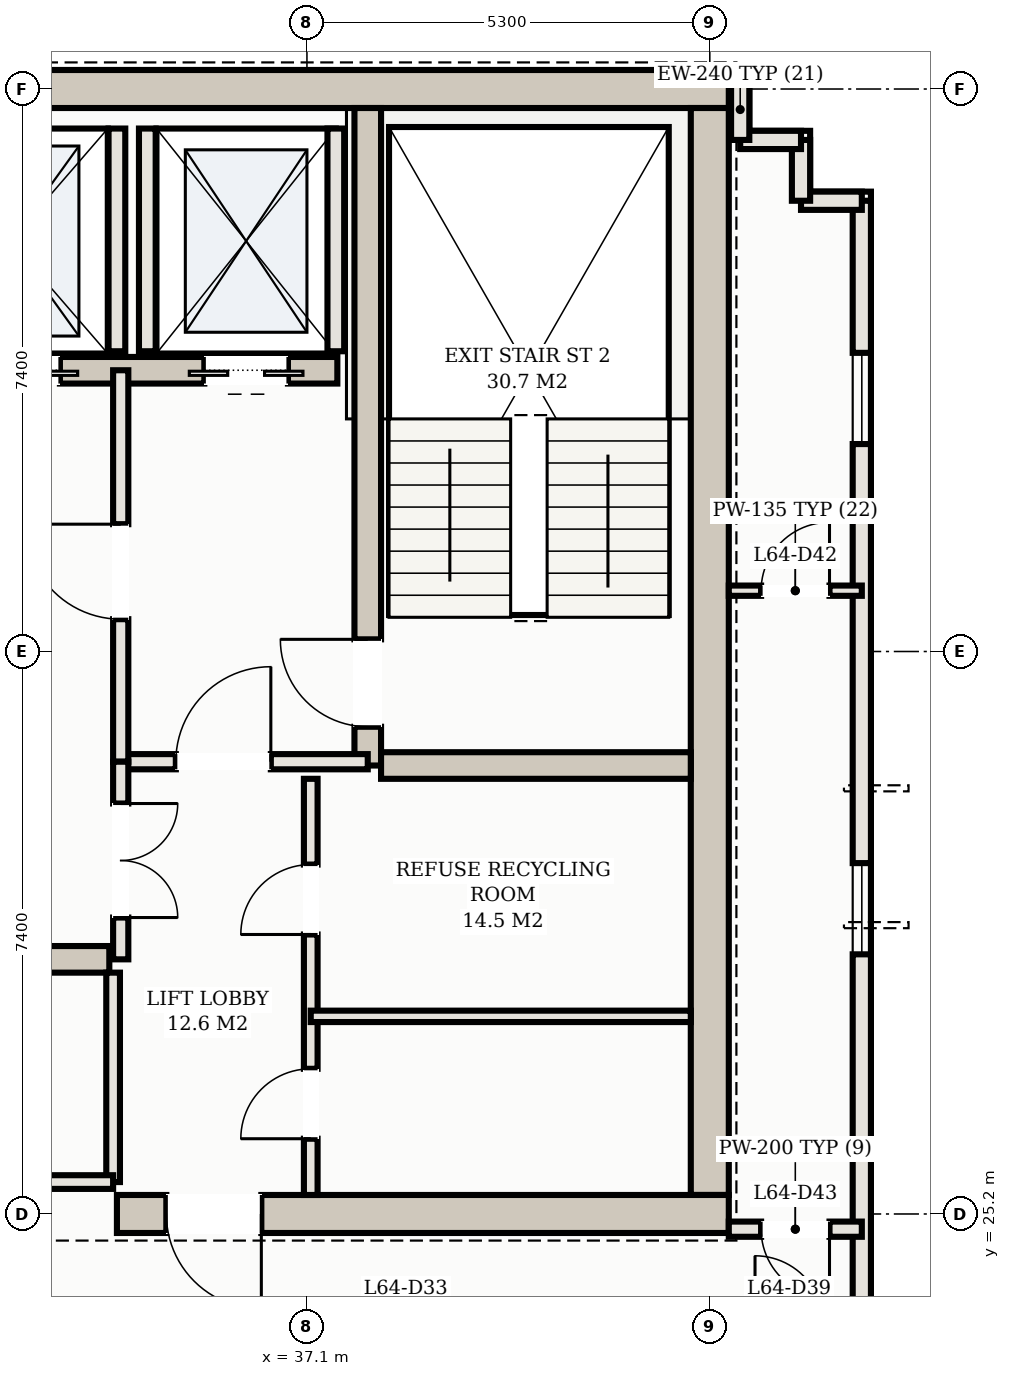
"""IFC4 building model, lengths in metres.
Left out: names, types, materials, properties, quantities, classifications, styles, units other than length and angle.
Written with IfcOpenShell. Run it as: python <this file> out.ifc"""

import sys

from ifc_helpers import new_model, si_unit, direction, frame, frame_2d, origin, place, context, subcontext, project, spatial, rectangle, extrude, element, fill, save


model = new_model("IFC4")
c1 = context("Model", 3, precision=1e-05, world=origin(), true_north=direction((0.0, 1.0)))
c2 = subcontext(c1, "Body", "Model", "MODEL_VIEW")
j1 = project(units=[si_unit("LENGTHUNIT", "METRE"), si_unit("PLANEANGLEUNIT", "RADIAN")], contexts=[c1])
p1 = place(None, origin())
s1 = spatial("IfcSite", under=j1, at=p1, CompositionType="ELEMENT")
p2 = place(p1, origin())
s2 = spatial("IfcBuilding", under=s1, at=p2, CompositionType="ELEMENT")
p3 = place(p2, frame((0.0, 0.0, 233.0)))
s3 = spatial("IfcBuildingStorey", under=s2, at=p3, CompositionType="ELEMENT", Elevation=233.0)
p4 = place(p3, frame((10.35, 40.0, 0.0), z_axis=(0.0, 0.0, 1.0), x_axis=(1.0, 0.0, 0.0)))
e1 = element("IfcWall", 1, at=p4, inside=s3, PredefinedType="SHEAR", context=c2, shape_type="SweptSolid", body=[
    extrude(rectangle(XDim=32.3, YDim=0.5, at=frame_2d((16.15, 0.0))), origin(), (0.0, 0.0, 1.0), 3.11),
])
p5 = place(p3, frame((42.4, 25.45, 0.0), z_axis=(0.0, 0.0, 1.0), x_axis=(0.0, 1.0, 0.0)))
e2 = element("IfcWall", 2, at=p5, inside=s3, PredefinedType="SHEAR", context=c2, shape_type="SweptSolid", body=[
    extrude(rectangle(XDim=14.3, YDim=0.5, at=frame_2d((7.15, 0.0))), origin(), (0.0, 0.0, 1.0), 3.11),
])
p6 = place(p3, frame((34.6, 25.2, 0.0), z_axis=(0.0, 0.0, 1.0), x_axis=(1.0, 0.0, 0.0)))
e3 = element("IfcWall", 3, at=p6, inside=s3, PredefinedType="SHEAR", context=c2, shape_type="SweptSolid", body=[
    extrude(rectangle(XDim=8.05, YDim=0.5, at=frame_2d((4.025, 0.0))), origin(), (0.0, 0.0, 1.0), 3.11),
])
p7 = place(p6, frame((0.65, 0.0, 0.0)))
e4 = element("IfcOpeningElement", 4, at=p7, cuts=e3, PredefinedType="OPENING", context=c2, shape_type="SweptSolid", body=[
    extrude(rectangle(XDim=1.25, YDim=2.2, at=frame_2d((0.625, 1.1))), frame((0.0, 0.26, 0.0), z_axis=(0.0, -1.0, 0.0), x_axis=(1.0, 0.0, 0.0)), (0.0, 0.0, 1.0), 0.52),
])
p8 = place(p3, frame((37.9, 31.1, 0.0), z_axis=(0.0, 0.0, 1.0), x_axis=(0.0, 1.0, 0.0)))
e5 = element("IfcWall", 5, at=p8, inside=s3, PredefinedType="SHEAR", context=c2, shape_type="SweptSolid", body=[
    extrude(rectangle(XDim=8.65, YDim=0.35, at=frame_2d((4.325, 0.0))), origin(), (0.0, 0.0, 1.0), 3.11),
])
p9 = place(p8, frame((0.51, 0.0, 0.0)))
e6 = element("IfcOpeningElement", 6, at=p9, cuts=e5, PredefinedType="OPENING", context=c2, shape_type="SweptSolid", body=[
    extrude(rectangle(XDim=1.15, YDim=2.2, at=frame_2d((0.575, 1.1))), frame((0.0, 0.185, 0.0), z_axis=(0.0, -1.0, 0.0), x_axis=(1.0, 0.0, 0.0)), (0.0, 0.0, 1.0), 0.37),
])
p10 = place(p3, frame((38.075, 31.1, 0.0), z_axis=(0.0, 0.0, 1.0), x_axis=(1.0, 0.0, 0.0)))
e7 = element("IfcWall", 7, at=p10, inside=s3, PredefinedType="SHEAR", context=c2, shape_type="SweptSolid", body=[
    extrude(rectangle(XDim=4.075, YDim=0.35, at=frame_2d((2.038, 0.0))), origin(), (0.0, 0.0, 1.0), 3.11),
])
p11 = place(p3, frame((15.5, 36.3, 0.0), z_axis=(0.0, 0.0, 1.0), x_axis=(1.0, 0.0, 0.0)))
e8 = element("IfcWall", 8, at=p11, inside=s3, PredefinedType="SHEAR", context=c2, shape_type="SweptSolid", body=[
    extrude(rectangle(XDim=22.0, YDim=0.35, at=frame_2d((11.0, 0.0))), origin(), (0.0, 0.0, 1.0), 3.11),
])
p12 = place(p11, frame((0.65, 0.0, 0.0)))
e9 = element("IfcOpeningElement", 9, at=p12, cuts=e8, PredefinedType="OPENING", context=c2, shape_type="SweptSolid", body=[
    extrude(rectangle(XDim=1.1, YDim=2.15, at=frame_2d((0.55, 1.075))), frame((0.0, 0.185, 0.0), z_axis=(0.0, -1.0, 0.0), x_axis=(1.0, 0.0, 0.0)), (0.0, 0.0, 1.0), 0.37),
])
p13 = place(p11, frame((20.25, 0.0, 0.0)))
e10 = element("IfcOpeningElement", 10, at=p13, cuts=e8, PredefinedType="OPENING", context=c2, shape_type="SweptSolid", body=[
    extrude(rectangle(XDim=1.1, YDim=2.15, at=frame_2d((0.55, 1.075))), frame((0.0, 0.185, 0.0), z_axis=(0.0, -1.0, 0.0), x_axis=(1.0, 0.0, 0.0)), (0.0, 0.0, 1.0), 0.37),
])
p14 = place(p11, frame((17.05, 0.0, 0.0)))
e11 = element("IfcOpeningElement", 11, at=p14, cuts=e8, PredefinedType="OPENING", context=c2, shape_type="SweptSolid", body=[
    extrude(rectangle(XDim=1.3, YDim=2.2, at=frame_2d((0.65, 1.1))), frame((0.0, 0.185, 0.0), z_axis=(0.0, -1.0, 0.0), x_axis=(1.0, 0.0, 0.0)), (0.0, 0.0, 1.0), 0.37),
])
p15 = place(p11, frame((3.95, 0.0, 0.0)))
e12 = element("IfcOpeningElement", 12, at=p15, cuts=e8, PredefinedType="OPENING", context=c2, shape_type="SweptSolid", body=[
    extrude(rectangle(XDim=1.1, YDim=2.15, at=frame_2d((0.55, 1.075))), frame((0.0, 0.185, 0.0), z_axis=(0.0, -1.0, 0.0), x_axis=(1.0, 0.0, 0.0)), (0.0, 0.0, 1.0), 0.37),
])
p16 = place(p11, frame((6.55, 0.0, 0.0)))
e13 = element("IfcOpeningElement", 13, at=p16, cuts=e8, PredefinedType="OPENING", context=c2, shape_type="SweptSolid", body=[
    extrude(rectangle(XDim=1.1, YDim=2.15, at=frame_2d((0.55, 1.075))), frame((0.0, 0.185, 0.0), z_axis=(0.0, -1.0, 0.0), x_axis=(1.0, 0.0, 0.0)), (0.0, 0.0, 1.0), 0.37),
])
p17 = place(p11, frame((9.15, 0.0, 0.0)))
e14 = element("IfcOpeningElement", 14, at=p17, cuts=e8, PredefinedType="OPENING", context=c2, shape_type="SweptSolid", body=[
    extrude(rectangle(XDim=1.1, YDim=2.15, at=frame_2d((0.55, 1.075))), frame((0.0, 0.185, 0.0), z_axis=(0.0, -1.0, 0.0), x_axis=(1.0, 0.0, 0.0)), (0.0, 0.0, 1.0), 0.37),
])
p18 = place(p3, frame((18.5, 28.55, 0.0), z_axis=(0.0, 0.0, 1.0), x_axis=(1.0, 0.0, 0.0)))
e15 = element("IfcWall", 15, at=p18, inside=s3, PredefinedType="SHEAR", context=c2, shape_type="SweptSolid", body=[
    extrude(rectangle(XDim=16.0, YDim=0.35, at=frame_2d((8.0, 0.0))), origin(), (0.0, 0.0, 1.0), 3.11),
])
for number, where, z_axis, x_axis in (
    (16, (35.0, 36.55, 0.0), (0.0, 0.0, 1.0), (0.0, 1.0, 0.0)),
    (17, (37.48, 36.55, 0.0), (0.0, 0.0, 1.0), (0.0, 1.0, 0.0)),
    (18, (34.6, 36.55, 0.0), (0.0, 0.0, 1.0), (0.0, 1.0, 0.0)),
):
    element("IfcWall", number, at=place(p3, frame(where, z_axis=z_axis, x_axis=x_axis)), inside=s3, PredefinedType="SOLIDWALL", context=c2, shape_type="SweptSolid", body=[
        extrude(rectangle(XDim=2.93, YDim=0.22, at=frame_2d((1.465, 0.0))), origin(), (0.0, 0.0, 1.0), 3.11),
    ])
p19 = place(p3, frame((44.4, 12.52, 0.0), z_axis=(0.0, 0.0, 1.0), x_axis=(0.0, 1.0, 0.0)))
e19 = element("IfcWall", 19, at=p19, inside=s3, PredefinedType="SOLIDWALL", context=c2, shape_type="SweptSolid", body=[
    extrude(rectangle(XDim=26.01, YDim=0.24, at=frame_2d((13.005, 0.0))), origin(), (0.0, 0.0, 1.0), 3.11),
])
p20 = place(p19, frame((4.48, 0.0, 0.0)))
e20 = element("IfcOpeningElement", 20, at=p20, cuts=e19, PredefinedType="OPENING", context=c2, shape_type="SweptSolid", body=[
    extrude(rectangle(XDim=1.8, YDim=2.2, at=frame_2d((0.9, 1.1))), frame((0.0, 0.13, 0.0), z_axis=(0.0, -1.0, 0.0), x_axis=(1.0, 0.0, 0.0)), (0.0, 0.0, 1.0), 0.26),
])
p21 = place(p19, frame((0.426, 0.0, 0.75)))
e21 = element("IfcOpeningElement", 21, at=p21, cuts=e19, PredefinedType="OPENING", context=c2, shape_type="SweptSolid", body=[
    extrude(rectangle(XDim=1.5, YDim=1.6, at=frame_2d((0.75, 0.8))), frame((0.0, 0.13, 0.0), z_axis=(0.0, -1.0, 0.0), x_axis=(1.0, 0.0, 0.0)), (0.0, 0.0, 1.0), 0.26),
])
p22 = place(p19, frame((2.784, 0.0, 0.75)))
e22 = element("IfcOpeningElement", 22, at=p22, cuts=e19, PredefinedType="OPENING", context=c2, shape_type="SweptSolid", body=[
    extrude(rectangle(XDim=1.2, YDim=1.5, at=frame_2d((0.6, 0.75))), frame((0.0, 0.13, 0.0), z_axis=(0.0, -1.0, 0.0), x_axis=(1.0, 0.0, 0.0)), (0.0, 0.0, 1.0), 0.26),
])
p23 = place(p19, frame((8.135, 0.0, 0.75)))
e23 = element("IfcOpeningElement", 23, at=p23, cuts=e19, PredefinedType="OPENING", context=c2, shape_type="SweptSolid", body=[
    extrude(rectangle(XDim=1.2, YDim=1.5, at=frame_2d((0.6, 0.75))), frame((0.0, 0.13, 0.0), z_axis=(0.0, -1.0, 0.0), x_axis=(1.0, 0.0, 0.0)), (0.0, 0.0, 1.0), 0.26),
])
p24 = place(p19, frame((16.096, 0.0, 0.75)))
e24 = element("IfcOpeningElement", 24, at=p24, cuts=e19, PredefinedType="OPENING", context=c2, shape_type="SweptSolid", body=[
    extrude(rectangle(XDim=1.2, YDim=1.5, at=frame_2d((0.6, 0.75))), frame((0.0, 0.13, 0.0), z_axis=(0.0, -1.0, 0.0), x_axis=(1.0, 0.0, 0.0)), (0.0, 0.0, 1.0), 0.26),
])
p25 = place(p19, frame((22.809, 0.0, 0.75)))
e25 = element("IfcOpeningElement", 25, at=p25, cuts=e19, PredefinedType="OPENING", context=c2, shape_type="SweptSolid", body=[
    extrude(rectangle(XDim=1.2, YDim=1.5, at=frame_2d((0.6, 0.75))), frame((0.0, 0.13, 0.0), z_axis=(0.0, -1.0, 0.0), x_axis=(1.0, 0.0, 0.0)), (0.0, 0.0, 1.0), 0.26),
])
p26 = place(p3, frame((44.4, 38.53, 0.0), z_axis=(0.0, 0.0, 1.0), x_axis=(-1.0, 0.0, 0.0)))
e26 = element("IfcWall", 26, at=p26, inside=s3, PredefinedType="SOLIDWALL", context=c2, shape_type="SweptSolid", body=[
    extrude(rectangle(XDim=0.8, YDim=0.24, at=frame_2d((0.4, 0.0))), origin(), (0.0, 0.0, 1.0), 3.11),
])
for number, where, z_axis, x_axis in (
    (27, (43.6, 38.53, 0.0), (0.0, 0.0, 1.0), (0.0, 1.0, 0.0)),
    (28, (43.6, 39.33, 0.0), (0.0, 0.0, 1.0), (-1.0, 0.0, 0.0)),
):
    element("IfcWall", number, at=place(p3, frame(where, z_axis=z_axis, x_axis=x_axis)), inside=s3, PredefinedType="SOLIDWALL", context=c2, shape_type="SweptSolid", body=[
        extrude(rectangle(XDim=0.8, YDim=0.24, at=frame_2d((0.4, 0.0))), origin(), (0.0, 0.0, 1.0), 3.11),
    ])
p27 = place(p3, frame((42.8, 39.33, 0.0), z_axis=(0.0, 0.0, 1.0), x_axis=(0.0, 1.0, 0.0)))
e29 = element("IfcWall", 29, at=p27, inside=s3, PredefinedType="SOLIDWALL", context=c2, shape_type="SweptSolid", body=[
    extrude(rectangle(XDim=0.8, YDim=0.24, at=frame_2d((0.4, 0.0))), origin(), (0.0, 0.0, 1.0), 3.11),
])
p28 = place(p3, frame((34.65, 31.15, 0.0), z_axis=(0.0, 0.0, 1.0), x_axis=(1.0, 0.0, 0.0)))
e30 = element("IfcWall", 30, at=p28, inside=s3, PredefinedType="PARTITIONING", context=c2, shape_type="SweptSolid", body=[
    extrude(rectangle(XDim=3.25, YDim=0.2, at=frame_2d((1.625, 0.0))), origin(), (0.0, 0.0, 1.0), 2.45),
])
p29 = place(p28, frame((0.725, 0.0, 0.0)))
e31 = element("IfcOpeningElement", 31, at=p29, cuts=e30, PredefinedType="OPENING", context=c2, shape_type="SweptSolid", body=[
    extrude(rectangle(XDim=1.25, YDim=2.2, at=frame_2d((0.625, 1.1))), frame((0.0, 0.11, 0.0), z_axis=(0.0, -1.0, 0.0), x_axis=(1.0, 0.0, 0.0)), (0.0, 0.0, 1.0), 0.22),
])
p30 = place(p3, frame((34.65, 31.15, 0.0), z_axis=(0.0, 0.0, 1.0), x_axis=(0.0, 1.0, 0.0)))
e32 = element("IfcWall", 32, at=p30, inside=s3, PredefinedType="PARTITIONING", context=c2, shape_type="SweptSolid", body=[
    extrude(rectangle(XDim=5.15, YDim=0.2, at=frame_2d((2.575, 0.0))), origin(), (0.0, 0.0, 1.0), 2.45),
])
p31 = place(p30, frame((1.875, 0.0, 0.0)))
e33 = element("IfcOpeningElement", 33, at=p31, cuts=e32, PredefinedType="OPENING", context=c2, shape_type="SweptSolid", body=[
    extrude(rectangle(XDim=1.25, YDim=2.2, at=frame_2d((0.625, 1.1))), frame((0.0, 0.11, 0.0), z_axis=(0.0, -1.0, 0.0), x_axis=(1.0, 0.0, 0.0)), (0.0, 0.0, 1.0), 0.22),
])
p32 = place(p3, frame((37.15, 25.45, 0.0), z_axis=(0.0, 0.0, 1.0), x_axis=(0.0, 1.0, 0.0)))
e34 = element("IfcWall", 34, at=p32, inside=s3, PredefinedType="PARTITIONING", context=c2, shape_type="SweptSolid", body=[
    extrude(rectangle(XDim=5.475, YDim=0.18, at=frame_2d((2.738, 0.0))), origin(), (0.0, 0.0, 1.0), 2.45),
])
p33 = place(p32, frame((0.74, 0.0, 0.0)))
e35 = element("IfcOpeningElement", 35, at=p33, cuts=e34, PredefinedType="OPENING", context=c2, shape_type="SweptSolid", body=[
    extrude(rectangle(XDim=0.92, YDim=2.15, at=frame_2d((0.46, 1.075))), frame((0.0, 0.1, 0.0), z_axis=(0.0, -1.0, 0.0), x_axis=(1.0, 0.0, 0.0)), (0.0, 0.0, 1.0), 0.2),
])
p34 = place(p32, frame((3.427, 0.0, 0.0)))
e36 = element("IfcOpeningElement", 36, at=p34, cuts=e34, PredefinedType="OPENING", context=c2, shape_type="SweptSolid", body=[
    extrude(rectangle(XDim=0.92, YDim=2.15, at=frame_2d((0.46, 1.075))), frame((0.0, 0.1, 0.0), z_axis=(0.0, -1.0, 0.0), x_axis=(1.0, 0.0, 0.0)), (0.0, 0.0, 1.0), 0.2),
])
p35 = place(p3, frame((37.15, 27.8, 0.0), z_axis=(0.0, 0.0, 1.0), x_axis=(1.0, 0.0, 0.0)))
e37 = element("IfcWall", 37, at=p35, inside=s3, PredefinedType="PARTITIONING", context=c2, shape_type="SweptSolid", body=[
    extrude(rectangle(XDim=5.0, YDim=0.15, at=frame_2d((2.5, 0.0))), origin(), (0.0, 0.0, 1.0), 2.45),
])
p36 = place(p3, frame((34.65, 28.55, 0.0), z_axis=(0.0, 0.0, 1.0), x_axis=(0.0, 1.0, 0.0)))
e38 = element("IfcWall", 38, at=p36, inside=s3, PredefinedType="PARTITIONING", context=c2, shape_type="SweptSolid", body=[
    extrude(rectangle(XDim=2.6, YDim=0.2, at=frame_2d((1.3, 0.0))), origin(), (0.0, 0.0, 1.0), 2.45),
])
p37 = place(p36, frame((0.55, 0.0, 0.0)))
e39 = element("IfcOpeningElement", 39, at=p37, cuts=e38, PredefinedType="OPENING", context=c2, shape_type="SweptSolid", body=[
    extrude(rectangle(XDim=1.5, YDim=2.25, at=frame_2d((0.75, 1.125))), frame((0.0, 0.11, 0.0), z_axis=(0.0, -1.0, 0.0), x_axis=(1.0, 0.0, 0.0)), (0.0, 0.0, 1.0), 0.22),
])
p38 = place(p3, frame((34.55, 25.62, 0.0), z_axis=(0.0, 0.0, 1.0), x_axis=(0.0, 1.0, 0.0)))
e40 = element("IfcWall", 40, at=p38, inside=s3, PredefinedType="PARTITIONING", context=c2, shape_type="SweptSolid", body=[
    extrude(rectangle(XDim=2.755, YDim=0.18, at=frame_2d((1.377, 0.0))), origin(), (0.0, 0.0, 1.0), 2.45),
])
p39 = place(p3, frame((26.65, 25.62, 0.0), z_axis=(0.0, 0.0, 1.0), x_axis=(1.0, 0.0, 0.0)))
e41 = element("IfcWall", 41, at=p39, inside=s3, PredefinedType="PARTITIONING", context=c2, shape_type="SweptSolid", body=[
    extrude(rectangle(XDim=7.9, YDim=0.18, at=frame_2d((3.95, 0.0))), origin(), (0.0, 0.0, 1.0), 2.45),
])
p40 = place(p39, frame((3.34, 0.0, 0.0)))
e42 = element("IfcOpeningElement", 42, at=p40, cuts=e41, PredefinedType="OPENING", context=c2, shape_type="SweptSolid", body=[
    extrude(rectangle(XDim=0.92, YDim=2.15, at=frame_2d((0.46, 1.075))), frame((0.0, 0.1, 0.0), z_axis=(0.0, -1.0, 0.0), x_axis=(1.0, 0.0, 0.0)), (0.0, 0.0, 1.0), 0.2),
])
p41 = place(p3, frame((42.65, 25.0, 0.0), z_axis=(0.0, 0.0, 1.0), x_axis=(1.0, 0.0, 0.0)))
e43 = element("IfcWall", 43, at=p41, inside=s3, PredefinedType="PARTITIONING", context=c2, shape_type="SweptSolid", body=[
    extrude(rectangle(XDim=1.75, YDim=0.2, at=frame_2d((0.875, 0.0))), origin(), (0.0, 0.0, 1.0), 2.45),
])
p42 = place(p41, frame((0.425, 0.0, 0.0)))
e44 = element("IfcOpeningElement", 44, at=p42, cuts=e43, PredefinedType="OPENING", context=c2, shape_type="SweptSolid", body=[
    extrude(rectangle(XDim=0.9, YDim=2.15, at=frame_2d((0.45, 1.075))), frame((0.0, 0.11, 0.0), z_axis=(0.0, -1.0, 0.0), x_axis=(1.0, 0.0, 0.0)), (0.0, 0.0, 1.0), 0.22),
])
p43 = place(p3, frame((42.65, 33.4, 0.0), z_axis=(0.0, 0.0, 1.0), x_axis=(1.0, 0.0, 0.0)))
e45 = element("IfcWall", 45, at=p43, inside=s3, PredefinedType="PARTITIONING", context=c2, shape_type="SweptSolid", body=[
    extrude(rectangle(XDim=1.75, YDim=0.135, at=frame_2d((0.875, 0.0))), origin(), (0.0, 0.0, 1.0), 2.45),
])
p44 = place(p43, frame((0.425, 0.0, 0.0)))
e46 = element("IfcOpeningElement", 46, at=p44, cuts=e45, PredefinedType="OPENING", context=c2, shape_type="SweptSolid", body=[
    extrude(rectangle(XDim=0.9, YDim=2.15, at=frame_2d((0.45, 1.075))), frame((0.0, 0.078, 0.0), z_axis=(0.0, -1.0, 0.0), x_axis=(1.0, 0.0, 0.0)), (0.0, 0.0, 1.0), 0.155),
])
p45 = place(p13, frame((1.1, 0.0, 0.0), z_axis=(0.0, 0.0, 1.0), x_axis=(-1.0, 0.0, 0.0)))
e47 = element("IfcDoor", 47, at=p45, inside=s3, OperationType="DOUBLE_DOOR_SLIDING", PredefinedType="DOOR", context=c2, shape_type="SweptSolid", body=[
    extrude(rectangle(XDim=1.1, YDim=2.15, at=frame_2d((0.55, 1.075))), frame((0.0, 0.025, 0.0), z_axis=(0.0, -1.0, 0.0), x_axis=(1.0, 0.0, 0.0)), (0.0, 0.0, 1.0), 0.05),
])
fill(e10, e47)
p46 = place(p14, frame((1.3, 0.0, 0.0), z_axis=(0.0, 0.0, 1.0), x_axis=(-1.0, 0.0, 0.0)))
e48 = element("IfcDoor", 48, at=p46, inside=s3, OperationType="DOUBLE_DOOR_SLIDING", PredefinedType="DOOR", context=c2, shape_type="SweptSolid", body=[
    extrude(rectangle(XDim=1.3, YDim=2.2, at=frame_2d((0.65, 1.1))), frame((0.0, 0.025, 0.0), z_axis=(0.0, -1.0, 0.0), x_axis=(1.0, 0.0, 0.0)), (0.0, 0.0, 1.0), 0.05),
])
fill(e11, e48)
p47 = place(p7, frame((1.25, 0.0, 0.0), z_axis=(0.0, 0.0, 1.0), x_axis=(-1.0, 0.0, 0.0)))
e49 = element("IfcDoor", 49, at=p47, inside=s3, OperationType="SINGLE_SWING_LEFT", PredefinedType="DOOR", context=c2, shape_type="SweptSolid", body=[
    extrude(rectangle(XDim=1.25, YDim=2.2, at=frame_2d((0.625, 1.1))), frame((0.0, 0.025, 0.0), z_axis=(0.0, -1.0, 0.0), x_axis=(1.0, 0.0, 0.0)), (0.0, 0.0, 1.0), 0.05),
])
fill(e4, e49)
p48 = place(p29, origin())
e50 = element("IfcDoor", 50, at=p48, inside=s3, OperationType="SINGLE_SWING_RIGHT", PredefinedType="DOOR", context=c2, shape_type="SweptSolid", body=[
    extrude(rectangle(XDim=1.25, YDim=2.2, at=frame_2d((0.625, 1.1))), frame((0.0, 0.025, 0.0), z_axis=(0.0, -1.0, 0.0), x_axis=(1.0, 0.0, 0.0)), (0.0, 0.0, 1.0), 0.05),
])
fill(e31, e50)
p49 = place(p31, origin())
e51 = element("IfcDoor", 51, at=p49, inside=s3, OperationType="SINGLE_SWING_RIGHT", PredefinedType="DOOR", context=c2, shape_type="SweptSolid", body=[
    extrude(rectangle(XDim=1.25, YDim=2.2, at=frame_2d((0.625, 1.1))), frame((0.0, 0.025, 0.0), z_axis=(0.0, -1.0, 0.0), x_axis=(1.0, 0.0, 0.0)), (0.0, 0.0, 1.0), 0.05),
])
fill(e33, e51)
p50 = place(p9, origin())
e52 = element("IfcDoor", 52, at=p50, inside=s3, OperationType="SINGLE_SWING_RIGHT", PredefinedType="DOOR", context=c2, shape_type="SweptSolid", body=[
    extrude(rectangle(XDim=1.15, YDim=2.2, at=frame_2d((0.575, 1.1))), frame((0.0, 0.025, 0.0), z_axis=(0.0, -1.0, 0.0), x_axis=(1.0, 0.0, 0.0)), (0.0, 0.0, 1.0), 0.05),
])
fill(e6, e52)
p51 = place(p33, origin())
e53 = element("IfcDoor", 53, at=p51, inside=s3, OperationType="SINGLE_SWING_LEFT", PredefinedType="DOOR", context=c2, shape_type="SweptSolid", body=[
    extrude(rectangle(XDim=0.92, YDim=2.15, at=frame_2d((0.46, 1.075))), frame((0.0, 0.025, 0.0), z_axis=(0.0, -1.0, 0.0), x_axis=(1.0, 0.0, 0.0)), (0.0, 0.0, 1.0), 0.05),
])
fill(e35, e53)
p52 = place(p34, origin())
e54 = element("IfcDoor", 54, at=p52, inside=s3, OperationType="SINGLE_SWING_LEFT", PredefinedType="DOOR", context=c2, shape_type="SweptSolid", body=[
    extrude(rectangle(XDim=0.92, YDim=2.15, at=frame_2d((0.46, 1.075))), frame((0.0, 0.025, 0.0), z_axis=(0.0, -1.0, 0.0), x_axis=(1.0, 0.0, 0.0)), (0.0, 0.0, 1.0), 0.05),
])
fill(e36, e54)
p53 = place(p37, frame((1.5, 0.0, 0.0), z_axis=(0.0, 0.0, 1.0), x_axis=(-1.0, 0.0, 0.0)))
e55 = element("IfcDoor", 55, at=p53, inside=s3, OperationType="DOUBLE_DOOR_SINGLE_SWING", PredefinedType="DOOR", context=c2, shape_type="SweptSolid", body=[
    extrude(rectangle(XDim=1.5, YDim=2.25, at=frame_2d((0.75, 1.125))), frame((0.0, 0.025, 0.0), z_axis=(0.0, -1.0, 0.0), x_axis=(1.0, 0.0, 0.0)), (0.0, 0.0, 1.0), 0.05),
])
fill(e39, e55)
p54 = place(p44, origin())
e56 = element("IfcDoor", 56, at=p54, inside=s3, OperationType="SINGLE_SWING_RIGHT", PredefinedType="DOOR", context=c2, shape_type="SweptSolid", body=[
    extrude(rectangle(XDim=0.9, YDim=2.15, at=frame_2d((0.45, 1.075))), frame((0.0, 0.025, 0.0), z_axis=(0.0, -1.0, 0.0), x_axis=(1.0, 0.0, 0.0)), (0.0, 0.0, 1.0), 0.05),
])
fill(e46, e56)
p55 = place(p42, frame((0.9, 0.0, 0.0), z_axis=(0.0, 0.0, 1.0), x_axis=(-1.0, 0.0, 0.0)))
e57 = element("IfcDoor", 57, at=p55, inside=s3, OperationType="SINGLE_SWING_LEFT", PredefinedType="DOOR", context=c2, shape_type="SweptSolid", body=[
    extrude(rectangle(XDim=0.9, YDim=2.15, at=frame_2d((0.45, 1.075))), frame((0.0, 0.025, 0.0), z_axis=(0.0, -1.0, 0.0), x_axis=(1.0, 0.0, 0.0)), (0.0, 0.0, 1.0), 0.05),
])
fill(e44, e57)
p56 = place(p24, origin())
e58 = element("IfcWindow", 58, at=p56, inside=s3, PartitioningType="SINGLE_PANEL", PredefinedType="WINDOW", context=c2, shape_type="SweptSolid", body=[
    extrude(rectangle(XDim=1.2, YDim=1.5, at=frame_2d((0.6, 0.75))), frame((0.0, 0.03, 0.0), z_axis=(0.0, -1.0, 0.0), x_axis=(1.0, 0.0, 0.0)), (0.0, 0.0, 1.0), 0.06),
])
fill(e24, e58)
p57 = place(p25, origin())
e59 = element("IfcWindow", 59, at=p57, inside=s3, PartitioningType="SINGLE_PANEL", PredefinedType="WINDOW", context=c2, shape_type="SweptSolid", body=[
    extrude(rectangle(XDim=1.2, YDim=1.5, at=frame_2d((0.6, 0.75))), frame((0.0, 0.03, 0.0), z_axis=(0.0, -1.0, 0.0), x_axis=(1.0, 0.0, 0.0)), (0.0, 0.0, 1.0), 0.06),
])
fill(e25, e59)
save(model, sys.argv[1])
